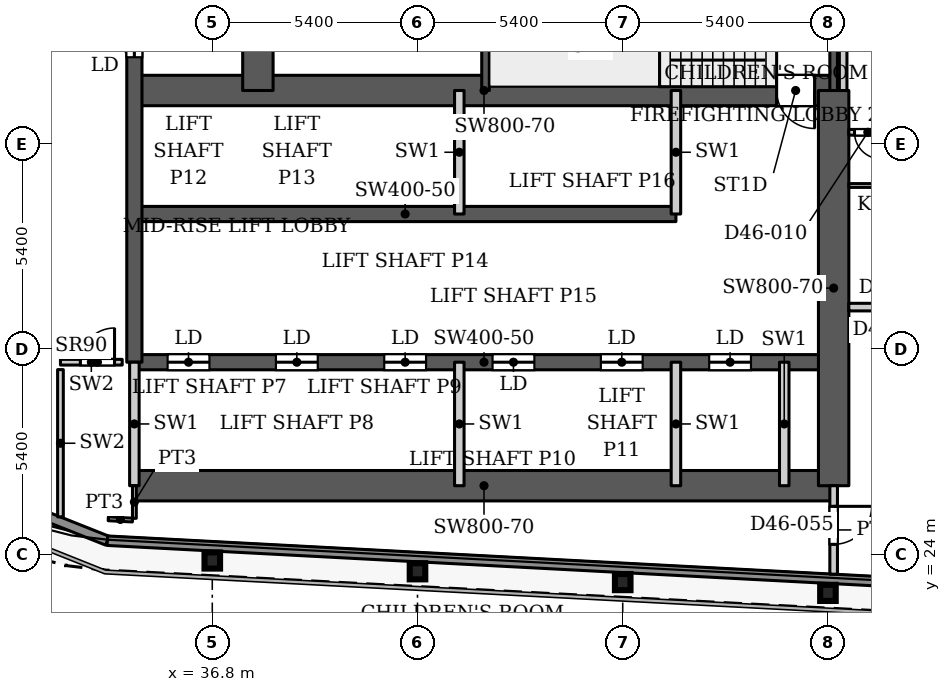
"""IFC4 building model, lengths in metres.
Left out: names, types, materials, properties, quantities, classifications, styles, units other than length and angle.
Written with IfcOpenShell. Run it as: python <this file> out.ifc"""

import sys

from ifc_helpers import new_model, si_unit, direction, frame, frame_2d, origin, origin_2d, place, context, subcontext, project, spatial, rectangle, i_section, extrude, source, transform, mapped, element, fill, save


model = new_model("IFC4")
c1 = context("Model", 3, precision=1e-05, world=origin(), true_north=direction((0.0, 1.0)))
c2 = subcontext(c1, "Body", "Model", "MODEL_VIEW")
j1 = project(units=[si_unit("LENGTHUNIT", "METRE"), si_unit("PLANEANGLEUNIT", "RADIAN")], contexts=[c1])
p1 = place(None, origin())
s1 = spatial("IfcSite", under=j1, at=p1, CompositionType="ELEMENT")
p2 = place(p1, origin())
s2 = spatial("IfcBuilding", under=s1, at=p2, CompositionType="ELEMENT")
p3 = place(p2, frame((0.0, 0.0, 199.4)))
s3 = spatial("IfcBuildingStorey", under=s2, at=p3, CompositionType="ELEMENT", Elevation=199.4)
for number, where, z_axis, x_axis in (
    (1, (53.0, 22.98, 0.0), (0.0, 0.0, 1.0), (1.0, 0.0, 0.0)),
    (2, (47.6, 23.264, 0.0), (0.0, 0.0, 1.0), (1.0, 0.0, 0.0)),
    (3, (42.2, 23.548, 0.0), (0.0, 0.0, 1.0), (1.0, 0.0, 0.0)),
    (4, (36.8, 23.832, 0.0), (0.0, 0.0, 1.0), (1.0, 0.0, 0.0)),
):
    element("IfcColumn", number, at=place(p3, frame(where, z_axis=z_axis, x_axis=x_axis)), inside=s3, PredefinedType="COLUMN", context=c2, shape_type="SweptSolid", body=[
        extrude(i_section(OverallWidth=0.409, OverallDepth=0.425, WebThickness=0.033, FlangeThickness=0.052, FilletRadius=0.013, at=origin_2d()), origin(), (0.0, 0.0, 1.0), 3.9),
    ])
p4 = place(p3, frame((34.75, 25.8, 0.0), z_axis=(0.0, 0.0, 1.0), x_axis=(1.0, 0.0, 0.0)))
e5 = element("IfcWall", 5, at=p4, inside=s3, PredefinedType="SHEAR", context=c2, shape_type="SweptSolid", body=[
    extrude(rectangle(XDim=18.4, YDim=0.8, at=frame_2d((9.2, 0.0))), origin(), (0.0, 0.0, 1.0), 3.9),
])
p5 = place(p3, frame((34.75, 29.05, 0.0), z_axis=(0.0, 0.0, 1.0), x_axis=(1.0, 0.0, 0.0)))
e6 = element("IfcWall", 6, at=p5, inside=s3, PredefinedType="SHEAR", context=c2, shape_type="SweptSolid", body=[
    extrude(rectangle(XDim=18.4, YDim=0.4, at=frame_2d((9.2, 0.0))), origin(), (0.0, 0.0, 1.0), 3.9),
])
p6 = place(p5, frame((0.875, 0.0, 0.0)))
e7 = element("IfcOpeningElement", 7, at=p6, cuts=e6, PredefinedType="OPENING", context=c2, shape_type="SweptSolid", body=[
    extrude(rectangle(XDim=1.1, YDim=2.2, at=frame_2d((0.55, 1.1))), frame((0.0, 0.21, 0.0), z_axis=(0.0, -1.0, 0.0), x_axis=(1.0, 0.0, 0.0)), (0.0, 0.0, 1.0), 0.42),
])
p7 = place(p5, frame((3.725, 0.0, 0.0)))
e8 = element("IfcOpeningElement", 8, at=p7, cuts=e6, PredefinedType="OPENING", context=c2, shape_type="SweptSolid", body=[
    extrude(rectangle(XDim=1.1, YDim=2.2, at=frame_2d((0.55, 1.1))), frame((0.0, 0.21, 0.0), z_axis=(0.0, -1.0, 0.0), x_axis=(1.0, 0.0, 0.0)), (0.0, 0.0, 1.0), 0.42),
])
p8 = place(p5, frame((6.575, 0.0, 0.0)))
e9 = element("IfcOpeningElement", 9, at=p8, cuts=e6, PredefinedType="OPENING", context=c2, shape_type="SweptSolid", body=[
    extrude(rectangle(XDim=1.1, YDim=2.2, at=frame_2d((0.55, 1.1))), frame((0.0, 0.21, 0.0), z_axis=(0.0, -1.0, 0.0), x_axis=(1.0, 0.0, 0.0)), (0.0, 0.0, 1.0), 0.42),
])
p9 = place(p5, frame((9.425, 0.0, 0.0)))
e10 = element("IfcOpeningElement", 10, at=p9, cuts=e6, PredefinedType="OPENING", context=c2, shape_type="SweptSolid", body=[
    extrude(rectangle(XDim=1.1, YDim=2.2, at=frame_2d((0.55, 1.1))), frame((0.0, 0.21, 0.0), z_axis=(0.0, -1.0, 0.0), x_axis=(1.0, 0.0, 0.0)), (0.0, 0.0, 1.0), 0.42),
])
p10 = place(p5, frame((12.275, 0.0, 0.0)))
e11 = element("IfcOpeningElement", 11, at=p10, cuts=e6, PredefinedType="OPENING", context=c2, shape_type="SweptSolid", body=[
    extrude(rectangle(XDim=1.1, YDim=2.2, at=frame_2d((0.55, 1.1))), frame((0.0, 0.21, 0.0), z_axis=(0.0, -1.0, 0.0), x_axis=(1.0, 0.0, 0.0)), (0.0, 0.0, 1.0), 0.42),
])
p11 = place(p5, frame((15.125, 0.0, 0.0)))
e12 = element("IfcOpeningElement", 12, at=p11, cuts=e6, PredefinedType="OPENING", context=c2, shape_type="SweptSolid", body=[
    extrude(rectangle(XDim=1.1, YDim=2.2, at=frame_2d((0.55, 1.1))), frame((0.0, 0.21, 0.0), z_axis=(0.0, -1.0, 0.0), x_axis=(1.0, 0.0, 0.0)), (0.0, 0.0, 1.0), 0.42),
])
p12 = place(p3, frame((34.75, 32.95, 0.0), z_axis=(0.0, 0.0, 1.0), x_axis=(1.0, 0.0, 0.0)))
e13 = element("IfcWall", 13, at=p12, inside=s3, PredefinedType="SHEAR", context=c2, shape_type="SweptSolid", body=[
    extrude(rectangle(XDim=14.25, YDim=0.4, at=frame_2d((7.125, 0.0))), origin(), (0.0, 0.0, 1.0), 3.9),
])
p13 = place(p3, frame((34.75, 36.2, 0.0), z_axis=(0.0, 0.0, 1.0), x_axis=(1.0, 0.0, 0.0)))
e14 = element("IfcWall", 14, at=p13, inside=s3, PredefinedType="SHEAR", context=c2, shape_type="SweptSolid", body=[
    extrude(rectangle(XDim=18.4, YDim=0.8, at=frame_2d((9.2, 0.0))), origin(), (0.0, 0.0, 1.0), 3.9),
])
p14 = place(p13, frame((16.9, 0.0, 0.0)))
e15 = element("IfcOpeningElement", 15, at=p14, cuts=e14, PredefinedType="OPENING", context=c2, shape_type="SweptSolid", body=[
    extrude(rectangle(XDim=1.0, YDim=2.2, at=frame_2d((0.5, 1.1))), frame((0.0, 0.41, 0.0), z_axis=(0.0, -1.0, 0.0), x_axis=(1.0, 0.0, 0.0)), (0.0, 0.0, 1.0), 0.82),
])
p15 = place(p3, frame((34.75, 29.05, 0.0), z_axis=(0.0, 0.0, 1.0), x_axis=(0.0, 1.0, 0.0)))
e16 = element("IfcWall", 16, at=p15, inside=s3, PredefinedType="SHEAR", context=c2, shape_type="SweptSolid", body=[
    extrude(rectangle(XDim=18.45, YDim=0.4, at=frame_2d((9.225, 0.0))), origin(), (0.0, 0.0, 1.0), 3.9),
])
p16 = place(p15, frame((8.025, 0.0, 0.0)))
e17 = element("IfcOpeningElement", 17, at=p16, cuts=e16, PredefinedType="OPENING", context=c2, shape_type="SweptSolid", body=[
    extrude(rectangle(XDim=1.1, YDim=2.2, at=frame_2d((0.55, 1.1))), frame((0.0, 0.21, 0.0), z_axis=(0.0, -1.0, 0.0), x_axis=(1.0, 0.0, 0.0)), (0.0, 0.0, 1.0), 0.42),
])
p17 = place(p15, frame((10.875, 0.0, 0.0)))
e18 = element("IfcOpeningElement", 18, at=p17, cuts=e16, PredefinedType="OPENING", context=c2, shape_type="SweptSolid", body=[
    extrude(rectangle(XDim=1.1, YDim=2.2, at=frame_2d((0.55, 1.1))), frame((0.0, 0.21, 0.0), z_axis=(0.0, -1.0, 0.0), x_axis=(1.0, 0.0, 0.0)), (0.0, 0.0, 1.0), 0.42),
])
p18 = place(p15, frame((13.725, 0.0, 0.0)))
e19 = element("IfcOpeningElement", 19, at=p18, cuts=e16, PredefinedType="OPENING", context=c2, shape_type="SweptSolid", body=[
    extrude(rectangle(XDim=1.1, YDim=2.2, at=frame_2d((0.55, 1.1))), frame((0.0, 0.21, 0.0), z_axis=(0.0, -1.0, 0.0), x_axis=(1.0, 0.0, 0.0)), (0.0, 0.0, 1.0), 0.42),
])
p19 = place(p15, frame((15.95, 0.0, 0.0)))
e20 = element("IfcOpeningElement", 20, at=p19, cuts=e16, PredefinedType="OPENING", context=c2, shape_type="SweptSolid", body=[
    extrude(rectangle(XDim=1.1, YDim=2.2, at=frame_2d((0.55, 1.1))), frame((0.0, 0.21, 0.0), z_axis=(0.0, -1.0, 0.0), x_axis=(1.0, 0.0, 0.0)), (0.0, 0.0, 1.0), 0.42),
])
p20 = place(p3, frame((38.0, 36.2, 0.0), z_axis=(0.0, 0.0, 1.0), x_axis=(0.0, 1.0, 0.0)))
e21 = element("IfcWall", 21, at=p20, inside=s3, PredefinedType="SHEAR", context=c2, shape_type="SweptSolid", body=[
    extrude(rectangle(XDim=8.55, YDim=0.8, at=frame_2d((4.275, 0.0))), origin(), (0.0, 0.0, 1.0), 3.9),
])
p21 = place(p3, frame((53.15, 25.8, 0.0), z_axis=(0.0, 0.0, 1.0), x_axis=(0.0, 1.0, 0.0)))
e22 = element("IfcWall", 22, at=p21, inside=s3, PredefinedType="SHEAR", context=c2, shape_type="SweptSolid", body=[
    extrude(rectangle(XDim=10.4, YDim=0.8, at=frame_2d((5.2, 0.0))), origin(), (0.0, 0.0, 1.0), 3.9),
])
p22 = place(p3, frame((34.039, 24.353, 0.0), z_axis=(0.0, 0.0, 1.0), x_axis=(-0.929352825399, 0.369192803184, 0.0)))
e23 = element("IfcWall", 23, at=p22, inside=s3, PredefinedType="SOLIDWALL", context=c2, shape_type="SweptSolid", body=[
    extrude(rectangle(XDim=4.656, YDim=0.25, at=frame_2d((2.328, 0.0))), origin(), (0.0, 0.0, 1.0), 3.75),
])
p23 = place(p3, frame((100.586, 20.85, 0.0), z_axis=(0.0, 0.0, 1.0), x_axis=(-0.99861746497, 0.052565755559, 0.0)))
e24 = element("IfcWall", 24, at=p23, inside=s3, PredefinedType="SOLIDWALL", context=c2, shape_type="SweptSolid", body=[
    extrude(rectangle(XDim=66.639, YDim=0.25, at=frame_2d((33.319, 0.0))), origin(), (0.0, 0.0, 1.0), 3.75),
])
for number, where, z_axis, x_axis in (
    (25, (43.99, 36.2, 0.0), (0.0, 0.0, 1.0), (0.0, 1.0, 0.0)),
    (26, (53.15, 36.2, 0.0), (0.0, 0.0, 1.0), (0.0, 1.0, 0.0)),
):
    element("IfcWall", number, at=place(p3, frame(where, z_axis=z_axis, x_axis=x_axis)), inside=s3, PredefinedType="SHEAR", context=c2, shape_type="SweptSolid", body=[
        extrude(rectangle(XDim=3.15, YDim=0.2, at=frame_2d((1.575, 0.0))), origin(), (0.0, 0.0, 1.0), 3.9),
    ])
for number, where, z_axis, x_axis in (
    (27, (34.75, 25.8, 0.0), (0.0, 0.0, 1.0), (0.0, 1.0, 0.0)),
    (28, (43.3, 25.8, 0.0), (0.0, 0.0, 1.0), (0.0, 1.0, 0.0)),
    (29, (43.3, 32.95, 0.0), (0.0, 0.0, 1.0), (0.0, 1.0, 0.0)),
    (30, (49.0, 25.8, 0.0), (0.0, 0.0, 1.0), (0.0, 1.0, 0.0)),
    (31, (49.0, 32.95, 0.0), (0.0, 0.0, 1.0), (0.0, 1.0, 0.0)),
    (32, (51.85, 25.8, 0.0), (0.0, 0.0, 1.0), (0.0, 1.0, 0.0)),
):
    element("IfcWall", number, at=place(p3, frame(where, z_axis=z_axis, x_axis=x_axis)), inside=s3, PredefinedType="PARTITIONING", context=c2, shape_type="SweptSolid", body=[
        extrude(rectangle(XDim=3.25, YDim=0.25, at=frame_2d((1.625, 0.0))), origin(), (0.0, 0.0, 1.0), 3.9),
    ])
p24 = place(p3, frame((32.805, 29.05, 0.0), z_axis=(0.0, 0.0, 1.0), x_axis=(1.0, 0.0, 0.0)))
e33 = element("IfcWall", 33, at=p24, inside=s3, PredefinedType="PARTITIONING", context=c2, shape_type="SweptSolid", body=[
    extrude(rectangle(XDim=1.625, YDim=0.15, at=frame_2d((0.812, 0.0))), origin(), (0.0, 0.0, 1.0), 3.9),
])
p25 = place(p24, frame((0.523, 0.0, 0.0)))
e34 = element("IfcOpeningElement", 34, at=p25, cuts=e33, PredefinedType="OPENING", context=c2, shape_type="SweptSolid", body=[
    extrude(rectangle(XDim=0.9, YDim=2.2, at=frame_2d((0.45, 1.1))), frame((0.0, 0.085, 0.0), z_axis=(0.0, -1.0, 0.0), x_axis=(1.0, 0.0, 0.0)), (0.0, 0.0, 1.0), 0.17),
])
p26 = place(p3, frame((32.805, 24.98, 0.0), z_axis=(0.0, 0.0, 1.0), x_axis=(0.0, 1.0, 0.0)))
e35 = element("IfcWall", 35, at=p26, inside=s3, PredefinedType="PARTITIONING", context=c2, shape_type="SweptSolid", body=[
    extrude(rectangle(XDim=3.875, YDim=0.15, at=frame_2d((1.938, 0.0))), origin(), (0.0, 0.0, 1.0), 3.9),
])
p27 = place(p3, frame((34.063, 24.929, 0.0), z_axis=(0.0, 0.0, 1.0), x_axis=(0.998663963404, -0.051674831376, 0.0)))
e36 = element("IfcWall", 36, at=p27, inside=s3, PredefinedType="PARTITIONING", context=c2, shape_type="SweptSolid", body=[
    extrude(rectangle(XDim=0.638, YDim=0.1, at=frame_2d((0.319, 0.0))), origin(), (0.0, 0.0, 1.0), 3.6),
])
p28 = place(p3, frame((34.75, 24.942, 0.0), z_axis=(0.0, 0.0, 1.0), x_axis=(0.0, 1.0, 0.0)))
e37 = element("IfcWall", 37, at=p28, inside=s3, PredefinedType="PARTITIONING", context=c2, shape_type="SweptSolid", body=[
    extrude(rectangle(XDim=0.858, YDim=0.1, at=frame_2d((0.429, 0.0))), origin(), (0.0, 0.0, 1.0), 3.6),
])
p29 = place(p3, frame((53.15, 23.472, 0.0), z_axis=(0.0, 0.0, 1.0), x_axis=(0.0, 1.0, 0.0)))
e38 = element("IfcWall", 38, at=p29, inside=s3, PredefinedType="PARTITIONING", context=c2, shape_type="SweptSolid", body=[
    extrude(rectangle(XDim=2.328, YDim=0.2, at=frame_2d((1.164, 0.0))), origin(), (0.0, 0.0, 1.0), 3.6),
])
p30 = place(p29, frame((0.785, 0.0, 0.0)))
e39 = element("IfcOpeningElement", 39, at=p30, cuts=e38, PredefinedType="OPENING", context=c2, shape_type="SweptSolid", body=[
    extrude(rectangle(XDim=1.0, YDim=2.1, at=frame_2d((0.5, 1.05))), frame((0.0, 0.11, 0.0), z_axis=(0.0, -1.0, 0.0), x_axis=(1.0, 0.0, 0.0)), (0.0, 0.0, 1.0), 0.22),
])
p31 = place(p3, frame((53.4, 36.199, 0.0), z_axis=(0.0, 0.0, 1.0), x_axis=(0.0, 1.0, 0.0)))
e40 = element("IfcWall", 40, at=p31, inside=s3, PredefinedType="PARTITIONING", context=c2, shape_type="SweptSolid", body=[
    extrude(rectangle(XDim=7.701, YDim=0.2, at=frame_2d((3.851, 0.0))), origin(), (0.0, 0.0, 1.0), 3.6),
])
p32 = place(p3, frame((53.549, 30.5, 0.0), z_axis=(0.0, 0.0, 1.0), x_axis=(1.0, 0.0, 0.0)))
e41 = element("IfcWall", 41, at=p32, inside=s3, PredefinedType="PARTITIONING", context=c2, shape_type="SweptSolid", body=[
    extrude(rectangle(XDim=44.551, YDim=0.2, at=frame_2d((22.275, 0.0))), origin(), (0.0, 0.0, 1.0), 3.6),
])
p33 = place(p32, frame((5.501, 0.0, 0.0)))
e42 = element("IfcOpeningElement", 42, at=p33, cuts=e41, PredefinedType="OPENING", context=c2, shape_type="SweptSolid", body=[
    extrude(rectangle(XDim=1.0, YDim=2.1, at=frame_2d((0.5, 1.05))), frame((0.0, 0.11, 0.0), z_axis=(0.0, -1.0, 0.0), x_axis=(1.0, 0.0, 0.0)), (0.0, 0.0, 1.0), 0.22),
])
p34 = place(p32, frame((20.201, 0.0, 0.0)))
e43 = element("IfcOpeningElement", 43, at=p34, cuts=e41, PredefinedType="OPENING", context=c2, shape_type="SweptSolid", body=[
    extrude(rectangle(XDim=1.0, YDim=2.1, at=frame_2d((0.5, 1.05))), frame((0.0, 0.11, 0.0), z_axis=(0.0, -1.0, 0.0), x_axis=(1.0, 0.0, 0.0)), (0.0, 0.0, 1.0), 0.22),
])
p35 = place(p32, frame((24.251, 0.0, 0.0)))
e44 = element("IfcOpeningElement", 44, at=p35, cuts=e41, PredefinedType="OPENING", context=c2, shape_type="SweptSolid", body=[
    extrude(rectangle(XDim=1.0, YDim=2.1, at=frame_2d((0.5, 1.05))), frame((0.0, 0.11, 0.0), z_axis=(0.0, -1.0, 0.0), x_axis=(1.0, 0.0, 0.0)), (0.0, 0.0, 1.0), 0.22),
])
p36 = place(p32, frame((40.151, 0.0, 0.0)))
e45 = element("IfcOpeningElement", 45, at=p36, cuts=e41, PredefinedType="OPENING", context=c2, shape_type="SweptSolid", body=[
    extrude(rectangle(XDim=1.0, YDim=2.1, at=frame_2d((0.5, 1.05))), frame((0.0, 0.11, 0.0), z_axis=(0.0, -1.0, 0.0), x_axis=(1.0, 0.0, 0.0)), (0.0, 0.0, 1.0), 0.22),
])
p37 = place(p3, frame((53.549, 33.7, 0.0), z_axis=(0.0, 0.0, 1.0), x_axis=(1.0, 0.0, 0.0)))
e46 = element("IfcWall", 46, at=p37, inside=s3, PredefinedType="PARTITIONING", context=c2, shape_type="SweptSolid", body=[
    extrude(rectangle(XDim=5.001, YDim=0.1, at=frame_2d((2.5, 0.0))), origin(), (0.0, 0.0, 1.0), 3.6),
])
p38 = place(p37, frame((0.751, 0.0, 0.0)))
e47 = element("IfcOpeningElement", 47, at=p38, cuts=e46, PredefinedType="OPENING", context=c2, shape_type="SweptSolid", body=[
    extrude(rectangle(XDim=0.9, YDim=2.1, at=frame_2d((0.45, 1.05))), frame((0.0, 0.06, 0.0), z_axis=(0.0, -1.0, 0.0), x_axis=(1.0, 0.0, 0.0)), (0.0, 0.0, 1.0), 0.12),
])
p39 = place(p37, frame((3.651, 0.0, 0.0)))
e48 = element("IfcOpeningElement", 48, at=p39, cuts=e46, PredefinedType="OPENING", context=c2, shape_type="SweptSolid", body=[
    extrude(rectangle(XDim=0.8, YDim=2.1, at=frame_2d((0.4, 1.05))), frame((0.0, 0.06, 0.0), z_axis=(0.0, -1.0, 0.0), x_axis=(1.0, 0.0, 0.0)), (0.0, 0.0, 1.0), 0.12),
])
p40 = place(p3, frame((53.549, 35.1, 0.0), z_axis=(0.0, 0.0, 1.0), x_axis=(1.0, 0.0, 0.0)))
e49 = element("IfcWall", 49, at=p40, inside=s3, PredefinedType="PARTITIONING", context=c2, shape_type="SweptSolid", body=[
    extrude(rectangle(XDim=13.551, YDim=0.15, at=frame_2d((6.775, 0.0))), origin(), (0.0, 0.0, 1.0), 3.6),
])
p41 = place(p40, frame((3.901, 0.0, 0.0)))
e50 = element("IfcOpeningElement", 50, at=p41, cuts=e49, PredefinedType="OPENING", context=c2, shape_type="SweptSolid", body=[
    extrude(rectangle(XDim=0.9, YDim=2.1, at=frame_2d((0.45, 1.05))), frame((0.0, 0.085, 0.0), z_axis=(0.0, -1.0, 0.0), x_axis=(1.0, 0.0, 0.0)), (0.0, 0.0, 1.0), 0.17),
])
p42 = place(p40, frame((8.701, 0.0, 0.0)))
e51 = element("IfcOpeningElement", 51, at=p42, cuts=e49, PredefinedType="OPENING", context=c2, shape_type="SweptSolid", body=[
    extrude(rectangle(XDim=0.9, YDim=2.1, at=frame_2d((0.45, 1.05))), frame((0.0, 0.085, 0.0), z_axis=(0.0, -1.0, 0.0), x_axis=(1.0, 0.0, 0.0)), (0.0, 0.0, 1.0), 0.17),
])
p43 = place(p40, frame((11.501, 0.0, 0.0)))
e52 = element("IfcOpeningElement", 52, at=p43, cuts=e49, PredefinedType="OPENING", context=c2, shape_type="SweptSolid", body=[
    extrude(rectangle(XDim=1.0, YDim=2.1, at=frame_2d((0.5, 1.05))), frame((0.0, 0.085, 0.0), z_axis=(0.0, -1.0, 0.0), x_axis=(1.0, 0.0, 0.0)), (0.0, 0.0, 1.0), 0.17),
])
p44 = place(p40, frame((6.301, 0.0, 0.0)))
e53 = element("IfcOpeningElement", 53, at=p44, cuts=e49, PredefinedType="OPENING", context=c2, shape_type="SweptSolid", body=[
    extrude(rectangle(XDim=0.9, YDim=2.1, at=frame_2d((0.45, 1.05))), frame((0.0, 0.085, 0.0), z_axis=(0.0, -1.0, 0.0), x_axis=(1.0, 0.0, 0.0)), (0.0, 0.0, 1.0), 0.17),
])
p45 = place(p40, frame((0.15, 0.0, 0.0)))
e54 = element("IfcOpeningElement", 54, at=p45, cuts=e49, PredefinedType="OPENING", context=c2, shape_type="SweptSolid", body=[
    extrude(rectangle(XDim=0.7, YDim=2.1, at=frame_2d((0.35, 1.05))), frame((0.0, 0.085, 0.0), z_axis=(0.0, -1.0, 0.0), x_axis=(1.0, 0.0, 0.0)), (0.0, 0.0, 1.0), 0.17),
])
m1 = source(origin(), c2, "Body", "SweptSolid", [
    extrude(rectangle(XDim=1.1, YDim=2.2, at=frame_2d((0.55, 1.1))), frame((0.0, 0.025, 0.0), z_axis=(0.0, -1.0, 0.0), x_axis=(1.0, 0.0, 0.0)), (0.0, 0.0, 1.0), 0.05),
])
p46 = place(p6, origin())
e55 = element("IfcDoor", 55, at=p46, inside=s3, OperationType="SLIDING_TO_LEFT", PredefinedType="DOOR", context=c2, shape_type="MappedRepresentation", body=[
    mapped(m1, transform((0.0, 0.0, 0.0), x_axis=(1.0, 0.0, 0.0), y_axis=(0.0, 1.0, 0.0), z_axis=(0.0, 0.0, 1.0), scale=1.0)),
])
fill(e7, e55)
p47 = place(p7, origin())
e56 = element("IfcDoor", 56, at=p47, inside=s3, OperationType="SLIDING_TO_LEFT", PredefinedType="DOOR", context=c2, shape_type="MappedRepresentation", body=[
    mapped(m1, transform((0.0, 0.0, 0.0), x_axis=(1.0, 0.0, 0.0), y_axis=(0.0, 1.0, 0.0), z_axis=(0.0, 0.0, 1.0), scale=1.0)),
])
fill(e8, e56)
p48 = place(p8, origin())
e57 = element("IfcDoor", 57, at=p48, inside=s3, OperationType="SLIDING_TO_LEFT", PredefinedType="DOOR", context=c2, shape_type="MappedRepresentation", body=[
    mapped(m1, transform((0.0, 0.0, 0.0), x_axis=(1.0, 0.0, 0.0), y_axis=(0.0, 1.0, 0.0), z_axis=(0.0, 0.0, 1.0), scale=1.0)),
])
fill(e9, e57)
p49 = place(p9, origin())
e58 = element("IfcDoor", 58, at=p49, inside=s3, OperationType="SLIDING_TO_LEFT", PredefinedType="DOOR", context=c2, shape_type="MappedRepresentation", body=[
    mapped(m1, transform((0.0, 0.0, 0.0), x_axis=(1.0, 0.0, 0.0), y_axis=(0.0, 1.0, 0.0), z_axis=(0.0, 0.0, 1.0), scale=1.0)),
])
fill(e10, e58)
p50 = place(p10, origin())
e59 = element("IfcDoor", 59, at=p50, inside=s3, OperationType="SLIDING_TO_LEFT", PredefinedType="DOOR", context=c2, shape_type="MappedRepresentation", body=[
    mapped(m1, transform((0.0, 0.0, 0.0), x_axis=(1.0, 0.0, 0.0), y_axis=(0.0, 1.0, 0.0), z_axis=(0.0, 0.0, 1.0), scale=1.0)),
])
fill(e11, e59)
p51 = place(p16, origin())
e60 = element("IfcDoor", 60, at=p51, inside=s3, OperationType="SLIDING_TO_LEFT", PredefinedType="DOOR", context=c2, shape_type="MappedRepresentation", body=[
    mapped(m1, transform((0.0, 0.0, 0.0), x_axis=(1.0, 0.0, 0.0), y_axis=(0.0, 1.0, 0.0), z_axis=(0.0, 0.0, 1.0), scale=1.0)),
])
fill(e17, e60)
p52 = place(p11, origin())
e61 = element("IfcDoor", 61, at=p52, inside=s3, OperationType="SLIDING_TO_LEFT", PredefinedType="DOOR", context=c2, shape_type="MappedRepresentation", body=[
    mapped(m1, transform((0.0, 0.0, 0.0), x_axis=(1.0, 0.0, 0.0), y_axis=(0.0, 1.0, 0.0), z_axis=(0.0, 0.0, 1.0), scale=1.0)),
])
fill(e12, e61)
m2 = source(origin(), c2, "Body", "SweptSolid", [
    extrude(rectangle(XDim=0.9, YDim=2.2, at=frame_2d((0.45, 1.1))), frame((0.0, 0.025, 0.0), z_axis=(0.0, -1.0, 0.0), x_axis=(1.0, 0.0, 0.0)), (0.0, 0.0, 1.0), 0.05),
])
p53 = place(p25, origin())
e62 = element("IfcDoor", 62, at=p53, inside=s3, OperationType="SINGLE_SWING_LEFT", PredefinedType="DOOR", context=c2, shape_type="MappedRepresentation", body=[
    mapped(m2, transform((0.0, 0.0, 0.0), x_axis=(1.0, 0.0, 0.0), y_axis=(0.0, 1.0, 0.0), z_axis=(0.0, 0.0, 1.0), scale=1.0)),
])
fill(e34, e62)
m3 = source(origin(), c2, "Body", "SweptSolid", [
    extrude(rectangle(XDim=1.0, YDim=2.2, at=frame_2d((0.5, 1.1))), frame((0.0, 0.025, 0.0), z_axis=(0.0, -1.0, 0.0), x_axis=(1.0, 0.0, 0.0)), (0.0, 0.0, 1.0), 0.05),
])
p54 = place(p14, origin())
e63 = element("IfcDoor", 63, at=p54, inside=s3, OperationType="SINGLE_SWING_RIGHT", PredefinedType="DOOR", context=c2, shape_type="MappedRepresentation", body=[
    mapped(m3, transform((0.0, 0.0, 0.0), x_axis=(1.0, 0.0, 0.0), y_axis=(0.0, 1.0, 0.0), z_axis=(0.0, 0.0, 1.0), scale=1.0)),
])
fill(e15, e63)
m4 = source(origin(), c2, "Body", "SweptSolid", [
    extrude(rectangle(XDim=0.7, YDim=2.1, at=frame_2d((0.35, 1.05))), frame((0.0, 0.025, 0.0), z_axis=(0.0, -1.0, 0.0), x_axis=(1.0, 0.0, 0.0)), (0.0, 0.0, 1.0), 0.05),
])
p55 = place(p45, origin())
e64 = element("IfcDoor", 64, at=p55, inside=s3, OperationType="SINGLE_SWING_RIGHT", PredefinedType="DOOR", context=c2, shape_type="MappedRepresentation", body=[
    mapped(m4, transform((0.0, 0.0, 0.0), x_axis=(1.0, 0.0, 0.0), y_axis=(0.0, 1.0, 0.0), z_axis=(0.0, 0.0, 1.0), scale=1.0)),
])
fill(e54, e64)
m5 = source(origin(), c2, "Body", "SweptSolid", [
    extrude(rectangle(XDim=1.0, YDim=2.1, at=frame_2d((0.5, 1.05))), frame((0.0, 0.025, 0.0), z_axis=(0.0, -1.0, 0.0), x_axis=(1.0, 0.0, 0.0)), (0.0, 0.0, 1.0), 0.05),
])
p56 = place(p30, origin())
e65 = element("IfcDoor", 65, at=p56, inside=s3, OperationType="SINGLE_SWING_RIGHT", PredefinedType="DOOR", context=c2, shape_type="MappedRepresentation", body=[
    mapped(m5, transform((0.0, 0.0, 0.0), x_axis=(1.0, 0.0, 0.0), y_axis=(0.0, 1.0, 0.0), z_axis=(0.0, 0.0, 1.0), scale=1.0)),
])
fill(e39, e65)
save(model, sys.argv[1])
